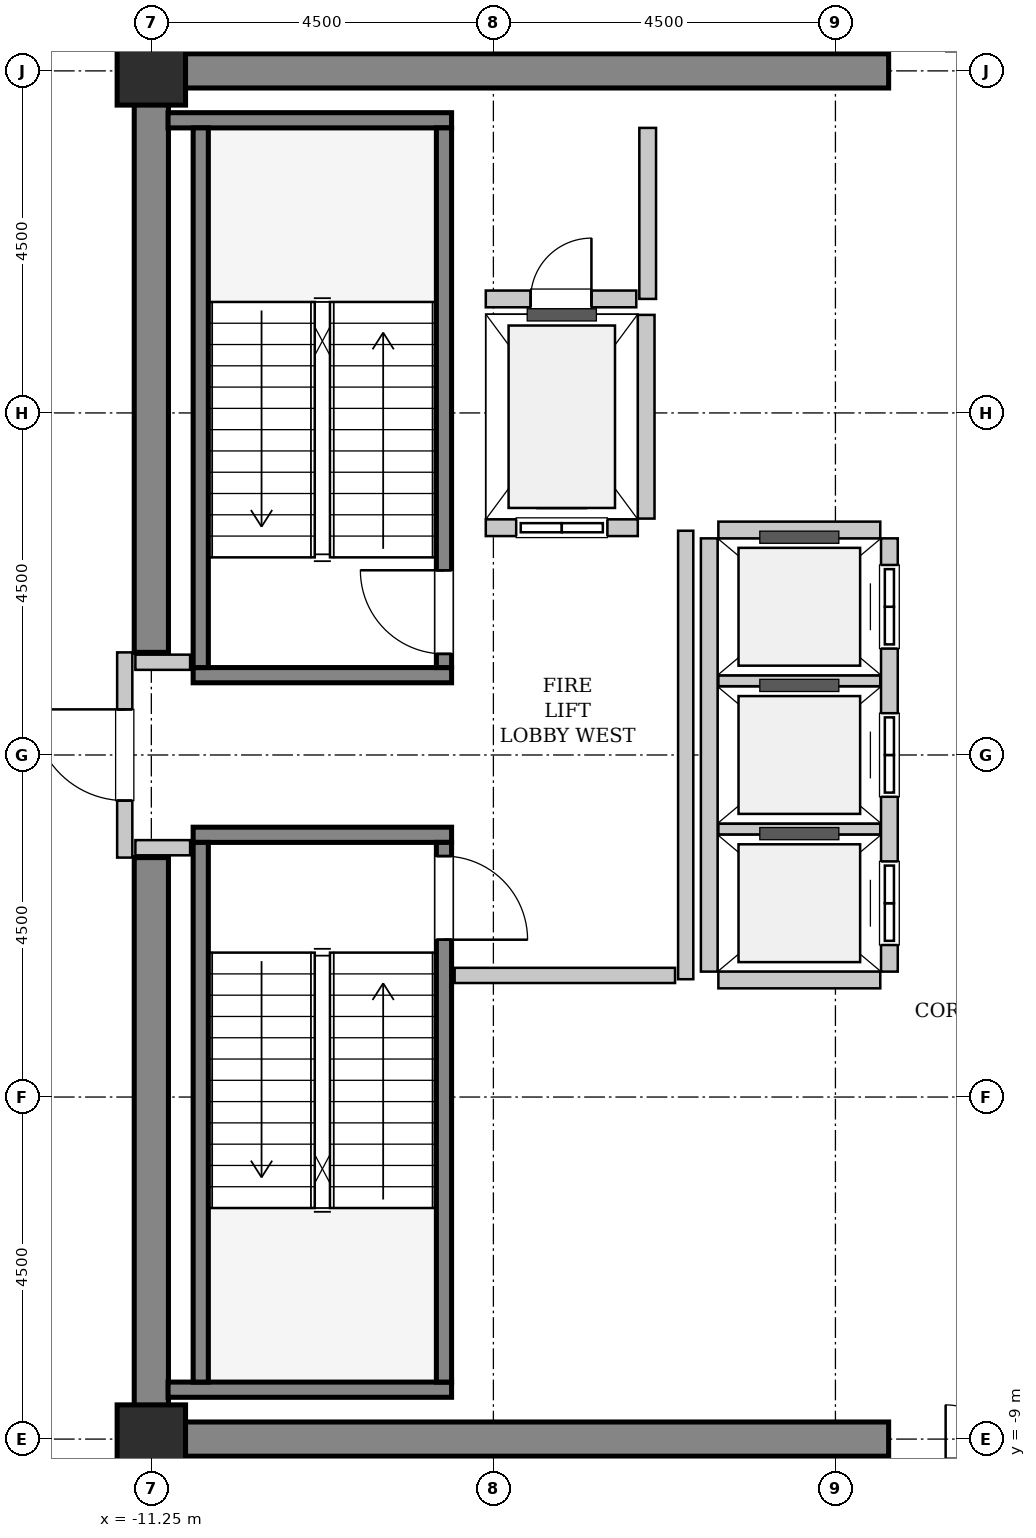
"""IFC4 building model, lengths in metres.
Left out: names, types, materials, properties, quantities, classifications, styles, units other than length and angle.
Written with IfcOpenShell. Run it as: python <this file> out.ifc"""

import sys

from ifc_helpers import new_model, si_unit, direction, frame, frame_2d, origin, origin_2d, place, context, subcontext, project, spatial, rectangle, extrude, source, transform, mapped, element, fill, save


model = new_model("IFC4")
c1 = context("Model", 3, precision=1e-05, world=origin(), true_north=direction((0.0, 1.0)))
c2 = subcontext(c1, "Body", "Model", "MODEL_VIEW")
j1 = project(units=[si_unit("LENGTHUNIT", "METRE"), si_unit("PLANEANGLEUNIT", "RADIAN")], contexts=[c1])
p1 = place(None, origin())
s1 = spatial("IfcSite", under=j1, at=p1, CompositionType="ELEMENT")
p2 = place(p1, origin())
s2 = spatial("IfcBuilding", under=s1, at=p2, CompositionType="ELEMENT")
p3 = place(p2, frame((0.0, 0.0, 317.8)))
s3 = spatial("IfcBuildingStorey", under=s2, at=p3, CompositionType="ELEMENT", Elevation=317.8)
m1 = source(origin(), c2, "Body", "SweptSolid", [
    extrude(rectangle(XDim=9.925, YDim=0.45, at=frame_2d((4.962, 0.0))), origin(), (0.0, 0.0, 1.0), 4.6),
])
for number, where, z_axis, x_axis in (
    (1, (-11.475, 9.0, 0.0), (0.0, 0.0, 1.0), (1.0, 0.0, 0.0)),
    (2, (-11.475, -9.0, 0.0), (0.0, 0.0, 1.0), (1.0, 0.0, 0.0)),
):
    element("IfcWall", number, at=place(p3, frame(where, z_axis=z_axis, x_axis=x_axis)), inside=s3, PredefinedType="SHEAR", context=c2, shape_type="MappedRepresentation", body=[
        mapped(m1, transform((0.0, 0.0, 0.0), x_axis=(1.0, 0.0, 0.0), y_axis=(0.0, 1.0, 0.0), z_axis=(0.0, 0.0, 1.0), scale=1.0)),
    ])
m2 = source(origin(), c2, "Body", "SweptSolid", [
    extrude(rectangle(XDim=7.425, YDim=0.45, at=frame_2d((3.712, 0.0))), origin(), (0.0, 0.0, 1.0), 4.6),
])
for number, where, z_axis, x_axis in (
    (3, (-11.25, -8.775, 0.0), (0.0, 0.0, 1.0), (0.0, 1.0, 0.0)),
    (4, (-11.25, 1.35, 0.0), (0.0, 0.0, 1.0), (0.0, 1.0, 0.0)),
):
    element("IfcWall", number, at=place(p3, frame(where, z_axis=z_axis, x_axis=x_axis)), inside=s3, PredefinedType="SHEAR", context=c2, shape_type="MappedRepresentation", body=[
        mapped(m2, transform((0.0, 0.0, 0.0), x_axis=(1.0, 0.0, 0.0), y_axis=(0.0, 1.0, 0.0), z_axis=(0.0, 0.0, 1.0), scale=1.0)),
    ])
m3 = source(origin(), c2, "Body", "SweptSolid", [
    extrude(rectangle(XDim=0.9, YDim=0.9, at=origin_2d()), origin(), (0.0, 0.0, 1.0), 4.6),
])
for number, where, z_axis, x_axis in (
    (5, (-11.25, -9.0, 0.0), (0.0, 0.0, 1.0), (1.0, 0.0, 0.0)),
    (6, (-11.25, 9.0, 0.0), (0.0, 0.0, 1.0), (1.0, 0.0, 0.0)),
):
    element("IfcColumn", number, at=place(p3, frame(where, z_axis=z_axis, x_axis=x_axis)), inside=s3, PredefinedType="COLUMN", context=c2, shape_type="MappedRepresentation", body=[
        mapped(m3, transform((0.0, 0.0, 0.0), x_axis=(1.0, 0.0, 0.0), y_axis=(0.0, 1.0, 0.0), z_axis=(0.0, 0.0, 1.0), scale=1.0)),
    ])
m4 = source(origin(), c2, "Body", "SweptSolid", [
    extrude(rectangle(XDim=3.4, YDim=0.2, at=frame_2d((1.7, 0.0))), origin(), (0.0, 0.0, 1.0), 4.6),
])
p4 = place(p3, frame((-7.3, 1.05, 0.0), z_axis=(0.0, 0.0, 1.0), x_axis=(-1.0, 0.0, 0.0)))
e7 = element("IfcWall", 7, at=p4, inside=s3, PredefinedType="SOLIDWALL", context=c2, shape_type="MappedRepresentation", body=[
    mapped(m4, transform((0.0, 0.0, 0.0), x_axis=(1.0, 0.0, 0.0), y_axis=(0.0, 1.0, 0.0), z_axis=(0.0, 0.0, 1.0), scale=1.0)),
])
m5 = source(origin(), c2, "Body", "SweptSolid", [
    extrude(rectangle(XDim=3.73, YDim=0.2, at=frame_2d((1.865, 0.0))), origin(), (0.0, 0.0, 1.0), 4.6),
])
p5 = place(p3, frame((-7.3, 8.35, 0.0), z_axis=(0.0, 0.0, 1.0), x_axis=(-1.0, 0.0, 0.0)))
e8 = element("IfcWall", 8, at=p5, inside=s3, PredefinedType="SOLIDWALL", context=c2, shape_type="MappedRepresentation", body=[
    mapped(m5, transform((0.0, 0.0, 0.0), x_axis=(1.0, 0.0, 0.0), y_axis=(0.0, 1.0, 0.0), z_axis=(0.0, 0.0, 1.0), scale=1.0)),
])
m6 = source(origin(), c2, "Body", "SweptSolid", [
    extrude(rectangle(XDim=7.1, YDim=0.2, at=frame_2d((3.55, 0.0))), origin(), (0.0, 0.0, 1.0), 4.6),
])
p6 = place(p3, frame((-7.4, 1.15, 0.0), z_axis=(0.0, 0.0, 1.0), x_axis=(0.0, 1.0, 0.0)))
e9 = element("IfcWall", 9, at=p6, inside=s3, PredefinedType="SOLIDWALL", context=c2, shape_type="MappedRepresentation", body=[
    mapped(m6, transform((0.0, 0.0, 0.0), x_axis=(1.0, 0.0, 0.0), y_axis=(0.0, 1.0, 0.0), z_axis=(0.0, 0.0, 1.0), scale=1.0)),
])
p7 = place(p6, frame((0.18, 0.0, 0.0)))
e10 = element("IfcOpeningElement", 10, at=p7, cuts=e9, PredefinedType="OPENING", context=c2, shape_type="SweptSolid", body=[
    extrude(rectangle(XDim=1.1, YDim=2.15, at=frame_2d((0.55, 1.075))), frame((0.0, 0.11, 0.0), z_axis=(0.0, -1.0, 0.0), x_axis=(1.0, 0.0, 0.0)), (0.0, 0.0, 1.0), 0.22),
])
p8 = place(p3, frame((-10.6, 1.15, 0.0), z_axis=(0.0, 0.0, 1.0), x_axis=(0.0, 1.0, 0.0)))
e11 = element("IfcWall", 11, at=p8, inside=s3, PredefinedType="SOLIDWALL", context=c2, shape_type="MappedRepresentation", body=[
    mapped(m6, transform((0.0, 0.0, 0.0), x_axis=(1.0, 0.0, 0.0), y_axis=(0.0, 1.0, 0.0), z_axis=(0.0, 0.0, 1.0), scale=1.0)),
])
p9 = place(p3, frame((-10.7, -1.05, 0.0), z_axis=(0.0, 0.0, 1.0), x_axis=(1.0, 0.0, 0.0)))
e12 = element("IfcWall", 12, at=p9, inside=s3, PredefinedType="SOLIDWALL", context=c2, shape_type="MappedRepresentation", body=[
    mapped(m4, transform((0.0, 0.0, 0.0), x_axis=(1.0, 0.0, 0.0), y_axis=(0.0, 1.0, 0.0), z_axis=(0.0, 0.0, 1.0), scale=1.0)),
])
p10 = place(p3, frame((-11.03, -8.35, 0.0), z_axis=(0.0, 0.0, 1.0), x_axis=(1.0, 0.0, 0.0)))
e13 = element("IfcWall", 13, at=p10, inside=s3, PredefinedType="SOLIDWALL", context=c2, shape_type="MappedRepresentation", body=[
    mapped(m5, transform((0.0, 0.0, 0.0), x_axis=(1.0, 0.0, 0.0), y_axis=(0.0, 1.0, 0.0), z_axis=(0.0, 0.0, 1.0), scale=1.0)),
])
p11 = place(p3, frame((-10.6, -1.15, 0.0), z_axis=(0.0, 0.0, 1.0), x_axis=(0.0, -1.0, 0.0)))
e14 = element("IfcWall", 14, at=p11, inside=s3, PredefinedType="SOLIDWALL", context=c2, shape_type="MappedRepresentation", body=[
    mapped(m6, transform((0.0, 0.0, 0.0), x_axis=(1.0, 0.0, 0.0), y_axis=(0.0, 1.0, 0.0), z_axis=(0.0, 0.0, 1.0), scale=1.0)),
])
p12 = place(p3, frame((-7.4, -1.15, 0.0), z_axis=(0.0, 0.0, 1.0), x_axis=(0.0, -1.0, 0.0)))
e15 = element("IfcWall", 15, at=p12, inside=s3, PredefinedType="SOLIDWALL", context=c2, shape_type="MappedRepresentation", body=[
    mapped(m6, transform((0.0, 0.0, 0.0), x_axis=(1.0, 0.0, 0.0), y_axis=(0.0, 1.0, 0.0), z_axis=(0.0, 0.0, 1.0), scale=1.0)),
])
p13 = place(p12, frame((0.18, 0.0, 0.0)))
e16 = element("IfcOpeningElement", 16, at=p13, cuts=e15, PredefinedType="OPENING", context=c2, shape_type="SweptSolid", body=[
    extrude(rectangle(XDim=1.1, YDim=2.15, at=frame_2d((0.55, 1.075))), frame((0.0, 0.11, 0.0), z_axis=(0.0, -1.0, 0.0), x_axis=(1.0, 0.0, 0.0)), (0.0, 0.0, 1.0), 0.22),
])
m7 = source(origin(), c2, "Body", "SweptSolid", [
    extrude(rectangle(XDim=2.0, YDim=0.22, at=frame_2d((1.0, 0.0))), origin(), (0.0, 0.0, 1.0), 4.335),
])
p14 = place(p3, frame((-6.85, 2.99, 0.0), z_axis=(0.0, 0.0, 1.0), x_axis=(1.0, 0.0, 0.0)))
e17 = element("IfcWall", 17, at=p14, inside=s3, PredefinedType="SOLIDWALL", context=c2, shape_type="MappedRepresentation", body=[
    mapped(m7, transform((0.0, 0.0, 0.0), x_axis=(1.0, 0.0, 0.0), y_axis=(0.0, 1.0, 0.0), z_axis=(0.0, 0.0, 1.0), scale=1.0)),
])
p15 = place(p14, frame((0.4, 0.0, 0.0)))
e18 = element("IfcOpeningElement", 18, at=p15, cuts=e17, PredefinedType="OPENING", context=c2, shape_type="SweptSolid", body=[
    extrude(rectangle(XDim=1.2, YDim=2.2, at=frame_2d((0.6, 1.1))), frame((0.0, 0.12, 0.0), z_axis=(0.0, -1.0, 0.0), x_axis=(1.0, 0.0, 0.0)), (0.0, 0.0, 1.0), 0.24),
])
m8 = source(origin(), c2, "Body", "SweptSolid", [
    extrude(rectangle(XDim=2.68, YDim=0.22, at=frame_2d((1.34, 0.0))), origin(), (0.0, 0.0, 1.0), 4.335),
])
p16 = place(p3, frame((-4.74, 3.11, 0.0), z_axis=(0.0, 0.0, 1.0), x_axis=(0.0, 1.0, 0.0)))
e19 = element("IfcWall", 19, at=p16, inside=s3, PredefinedType="SOLIDWALL", context=c2, shape_type="MappedRepresentation", body=[
    mapped(m8, transform((0.0, 0.0, 0.0), x_axis=(1.0, 0.0, 0.0), y_axis=(0.0, 1.0, 0.0), z_axis=(0.0, 0.0, 1.0), scale=1.0)),
])
m9 = source(origin(), c2, "Body", "SweptSolid", [
    extrude(rectangle(XDim=5.7, YDim=0.22, at=frame_2d((2.85, 0.0))), origin(), (0.0, 0.0, 1.0), 4.335),
])
p17 = place(p3, frame((-1.54, -2.85, 0.0), z_axis=(0.0, 0.0, 1.0), x_axis=(0.0, 1.0, 0.0)))
e20 = element("IfcWall", 20, at=p17, inside=s3, PredefinedType="SOLIDWALL", context=c2, shape_type="MappedRepresentation", body=[
    mapped(m9, transform((0.0, 0.0, 0.0), x_axis=(1.0, 0.0, 0.0), y_axis=(0.0, 1.0, 0.0), z_axis=(0.0, 0.0, 1.0), scale=1.0)),
])
p18 = place(p17, frame((0.35, 0.0, 0.0)))
e21 = element("IfcOpeningElement", 21, at=p18, cuts=e20, PredefinedType="OPENING", context=c2, shape_type="SweptSolid", body=[
    extrude(rectangle(XDim=1.1, YDim=2.2, at=frame_2d((0.55, 1.1))), frame((0.0, 0.12, 0.0), z_axis=(0.0, -1.0, 0.0), x_axis=(1.0, 0.0, 0.0)), (0.0, 0.0, 1.0), 0.24),
])
p19 = place(p17, frame((2.3, 0.0, 0.0)))
e22 = element("IfcOpeningElement", 22, at=p19, cuts=e20, PredefinedType="OPENING", context=c2, shape_type="SweptSolid", body=[
    extrude(rectangle(XDim=1.1, YDim=2.2, at=frame_2d((0.55, 1.1))), frame((0.0, 0.12, 0.0), z_axis=(0.0, -1.0, 0.0), x_axis=(1.0, 0.0, 0.0)), (0.0, 0.0, 1.0), 0.24),
])
p20 = place(p17, frame((4.25, 0.0, 0.0)))
e23 = element("IfcOpeningElement", 23, at=p20, cuts=e20, PredefinedType="OPENING", context=c2, shape_type="SweptSolid", body=[
    extrude(rectangle(XDim=1.1, YDim=2.2, at=frame_2d((0.55, 1.1))), frame((0.0, 0.12, 0.0), z_axis=(0.0, -1.0, 0.0), x_axis=(1.0, 0.0, 0.0)), (0.0, 0.0, 1.0), 0.24),
])
p21 = place(p3, frame((-3.91, 2.85, 0.0), z_axis=(0.0, 0.0, 1.0), x_axis=(0.0, -1.0, 0.0)))
e24 = element("IfcWall", 24, at=p21, inside=s3, PredefinedType="SOLIDWALL", context=c2, shape_type="MappedRepresentation", body=[
    mapped(m9, transform((0.0, 0.0, 0.0), x_axis=(1.0, 0.0, 0.0), y_axis=(0.0, 1.0, 0.0), z_axis=(0.0, 0.0, 1.0), scale=1.0)),
])
m10 = source(origin(), c2, "Body", "SweptSolid", [
    extrude(rectangle(XDim=2.13, YDim=0.22, at=frame_2d((1.065, 0.0))), origin(), (0.0, 0.0, 1.0), 4.335),
])
p22 = place(p3, frame((-3.79, -2.96, 0.0), z_axis=(0.0, 0.0, 1.0), x_axis=(1.0, 0.0, 0.0)))
e25 = element("IfcWall", 25, at=p22, inside=s3, PredefinedType="SOLIDWALL", context=c2, shape_type="MappedRepresentation", body=[
    mapped(m10, transform((0.0, 0.0, 0.0), x_axis=(1.0, 0.0, 0.0), y_axis=(0.0, 1.0, 0.0), z_axis=(0.0, 0.0, 1.0), scale=1.0)),
])
m11 = source(origin(), c2, "Body", "SweptSolid", [
    extrude(rectangle(XDim=2.13, YDim=0.14, at=frame_2d((1.065, 0.0))), origin(), (0.0, 0.0, 1.0), 4.335),
])
for number, where, z_axis, x_axis in (
    (26, (-3.79, -0.975, 0.0), (0.0, 0.0, 1.0), (1.0, 0.0, 0.0)),
    (27, (-3.79, 0.975, 0.0), (0.0, 0.0, 1.0), (1.0, 0.0, 0.0)),
):
    element("IfcWall", number, at=place(p3, frame(where, z_axis=z_axis, x_axis=x_axis)), inside=s3, PredefinedType="PARTITIONING", context=c2, shape_type="MappedRepresentation", body=[
        mapped(m11, transform((0.0, 0.0, 0.0), x_axis=(1.0, 0.0, 0.0), y_axis=(0.0, 1.0, 0.0), z_axis=(0.0, 0.0, 1.0), scale=1.0)),
    ])
p23 = place(p3, frame((-1.66, 2.96, 0.0), z_axis=(0.0, 0.0, 1.0), x_axis=(-1.0, 0.0, 0.0)))
e28 = element("IfcWall", 28, at=p23, inside=s3, PredefinedType="SOLIDWALL", context=c2, shape_type="MappedRepresentation", body=[
    mapped(m10, transform((0.0, 0.0, 0.0), x_axis=(1.0, 0.0, 0.0), y_axis=(0.0, 1.0, 0.0), z_axis=(0.0, 0.0, 1.0), scale=1.0)),
])
m12 = source(origin(), c2, "Body", "SweptSolid", [
    extrude(rectangle(XDim=2.25, YDim=0.22, at=frame_2d((1.125, 0.0))), origin(), (0.0, 0.0, 1.0), 4.335),
])
p24 = place(p3, frame((-4.72, 6.0, 0.0), z_axis=(0.0, 0.0, 1.0), x_axis=(0.0, 1.0, 0.0)))
e29 = element("IfcWall", 29, at=p24, inside=s3, PredefinedType="SOLIDWALL", context=c2, shape_type="MappedRepresentation", body=[
    mapped(m12, transform((0.0, 0.0, 0.0), x_axis=(1.0, 0.0, 0.0), y_axis=(0.0, 1.0, 0.0), z_axis=(0.0, 0.0, 1.0), scale=1.0)),
])
m13 = source(origin(), c2, "Body", "SweptSolid", [
    extrude(rectangle(XDim=1.98, YDim=0.22, at=frame_2d((0.99, 0.0))), origin(), (0.0, 0.0, 1.0), 4.335),
])
p25 = place(p3, frame((-6.85, 6.0, 0.0), z_axis=(0.0, 0.0, 1.0), x_axis=(1.0, 0.0, 0.0)))
e30 = element("IfcWall", 30, at=p25, inside=s3, PredefinedType="SOLIDWALL", context=c2, shape_type="MappedRepresentation", body=[
    mapped(m13, transform((0.0, 0.0, 0.0), x_axis=(1.0, 0.0, 0.0), y_axis=(0.0, 1.0, 0.0), z_axis=(0.0, 0.0, 1.0), scale=1.0)),
])
p26 = place(p25, frame((0.59, 0.0, 0.0)))
e31 = element("IfcOpeningElement", 31, at=p26, cuts=e30, PredefinedType="OPENING", context=c2, shape_type="SweptSolid", body=[
    extrude(rectangle(XDim=0.8, YDim=2.0, at=frame_2d((0.4, 1.0))), frame((0.0, 0.12, 0.0), z_axis=(0.0, -1.0, 0.0), x_axis=(1.0, 0.0, 0.0)), (0.0, 0.0, 1.0), 0.24),
])
m14 = source(origin(), c2, "Body", "SweptSolid", [
    extrude(rectangle(XDim=2.7, YDim=0.2, at=frame_2d((1.35, 0.0))), origin(), (0.0, 0.0, 1.0), 3.425),
])
p27 = place(p3, frame((-11.6, -1.35, 0.0), z_axis=(0.0, 0.0, 1.0), x_axis=(0.0, 1.0, 0.0)))
e32 = element("IfcWall", 32, at=p27, inside=s3, PredefinedType="PARTITIONING", context=c2, shape_type="MappedRepresentation", body=[
    mapped(m14, transform((0.0, 0.0, 0.0), x_axis=(1.0, 0.0, 0.0), y_axis=(0.0, 1.0, 0.0), z_axis=(0.0, 0.0, 1.0), scale=1.0)),
])
p28 = place(p27, frame((0.75, 0.0, 0.0)))
e33 = element("IfcOpeningElement", 33, at=p28, cuts=e32, PredefinedType="OPENING", context=c2, shape_type="SweptSolid", body=[
    extrude(rectangle(XDim=1.2, YDim=2.15, at=frame_2d((0.6, 1.075))), frame((0.0, 0.11, 0.0), z_axis=(0.0, -1.0, 0.0), x_axis=(1.0, 0.0, 0.0)), (0.0, 0.0, 1.0), 0.22),
])
m15 = source(origin(), c2, "Body", "SweptSolid", [
    extrude(rectangle(XDim=5.9, YDim=0.2, at=frame_2d((2.95, 0.0))), origin(), (0.0, 0.0, 1.0), 4.335),
])
p29 = place(p3, frame((-4.22, -2.95, 0.0), z_axis=(0.0, 0.0, 1.0), x_axis=(0.0, 1.0, 0.0)))
e34 = element("IfcWall", 34, at=p29, inside=s3, PredefinedType="PARTITIONING", context=c2, shape_type="MappedRepresentation", body=[
    mapped(m15, transform((0.0, 0.0, 0.0), x_axis=(1.0, 0.0, 0.0), y_axis=(0.0, 1.0, 0.0), z_axis=(0.0, 0.0, 1.0), scale=1.0)),
])
m16 = source(origin(), c2, "Body", "SweptSolid", [
    extrude(rectangle(XDim=2.9, YDim=0.2, at=frame_2d((1.45, 0.0))), origin(), (0.0, 0.0, 1.0), 4.335),
])
p30 = place(p3, frame((-7.26, -2.9, 0.0), z_axis=(0.0, 0.0, 1.0), x_axis=(1.0, 0.0, 0.0)))
e35 = element("IfcWall", 35, at=p30, inside=s3, PredefinedType="PARTITIONING", context=c2, shape_type="MappedRepresentation", body=[
    mapped(m16, transform((0.0, 0.0, 0.0), x_axis=(1.0, 0.0, 0.0), y_axis=(0.0, 1.0, 0.0), z_axis=(0.0, 0.0, 1.0), scale=1.0)),
])
m17 = source(origin(), c2, "Body", "SweptSolid", [
    extrude(rectangle(XDim=0.72, YDim=0.2, at=frame_2d((0.36, 0.0))), origin(), (0.0, 0.0, 1.0), 4.335),
])
for number, where, z_axis, x_axis in (
    (36, (-11.46, 1.22, 0.0), (0.0, 0.0, 1.0), (1.0, 0.0, 0.0)),
    (37, (-11.46, -1.22, 0.0), (0.0, 0.0, 1.0), (1.0, 0.0, 0.0)),
):
    element("IfcWall", number, at=place(p3, frame(where, z_axis=z_axis, x_axis=x_axis)), inside=s3, PredefinedType="PARTITIONING", context=c2, shape_type="MappedRepresentation", body=[
        mapped(m17, transform((0.0, 0.0, 0.0), x_axis=(1.0, 0.0, 0.0), y_axis=(0.0, 1.0, 0.0), z_axis=(0.0, 0.0, 1.0), scale=1.0)),
    ])
m18 = source(origin(), c2, "Body", "SweptSolid", [
    extrude(rectangle(XDim=1.1, YDim=2.15, at=frame_2d((0.55, 1.075))), frame((0.0, 0.025, 0.0), z_axis=(0.0, -1.0, 0.0), x_axis=(1.0, 0.0, 0.0)), (0.0, 0.0, 1.0), 0.05),
])
p31 = place(p7, origin())
e38 = element("IfcDoor", 38, at=p31, inside=s3, OperationType="SINGLE_SWING_RIGHT", PredefinedType="DOOR", context=c2, shape_type="MappedRepresentation", body=[
    mapped(m18, transform((0.0, 0.0, 0.0), x_axis=(1.0, 0.0, 0.0), y_axis=(0.0, 1.0, 0.0), z_axis=(0.0, 0.0, 1.0), scale=1.0)),
])
fill(e10, e38)
p32 = place(p13, origin())
e39 = element("IfcDoor", 39, at=p32, inside=s3, OperationType="SINGLE_SWING_RIGHT", PredefinedType="DOOR", context=c2, shape_type="MappedRepresentation", body=[
    mapped(m18, transform((0.0, 0.0, 0.0), x_axis=(1.0, 0.0, 0.0), y_axis=(0.0, 1.0, 0.0), z_axis=(0.0, 0.0, 1.0), scale=1.0)),
])
fill(e16, e39)
m19 = source(origin(), c2, "Body", "SweptSolid", [
    extrude(rectangle(XDim=1.2, YDim=2.2, at=frame_2d((0.6, 1.1))), frame((0.0, 0.025, 0.0), z_axis=(0.0, -1.0, 0.0), x_axis=(1.0, 0.0, 0.0)), (0.0, 0.0, 1.0), 0.05),
])
p33 = place(p15, origin())
e40 = element("IfcDoor", 40, at=p33, inside=s3, OperationType="SLIDING_TO_LEFT", PredefinedType="DOOR", context=c2, shape_type="MappedRepresentation", body=[
    mapped(m19, transform((0.0, 0.0, 0.0), x_axis=(1.0, 0.0, 0.0), y_axis=(0.0, 1.0, 0.0), z_axis=(0.0, 0.0, 1.0), scale=1.0)),
])
fill(e18, e40)
m20 = source(origin(), c2, "Body", "SweptSolid", [
    extrude(rectangle(XDim=1.1, YDim=2.2, at=frame_2d((0.55, 1.1))), frame((0.0, 0.025, 0.0), z_axis=(0.0, -1.0, 0.0), x_axis=(1.0, 0.0, 0.0)), (0.0, 0.0, 1.0), 0.05),
])
p34 = place(p18, origin())
e41 = element("IfcDoor", 41, at=p34, inside=s3, OperationType="DOUBLE_DOOR_SLIDING", PredefinedType="DOOR", context=c2, shape_type="MappedRepresentation", body=[
    mapped(m20, transform((0.0, 0.0, 0.0), x_axis=(1.0, 0.0, 0.0), y_axis=(0.0, 1.0, 0.0), z_axis=(0.0, 0.0, 1.0), scale=1.0)),
])
fill(e21, e41)
p35 = place(p19, origin())
e42 = element("IfcDoor", 42, at=p35, inside=s3, OperationType="DOUBLE_DOOR_SLIDING", PredefinedType="DOOR", context=c2, shape_type="MappedRepresentation", body=[
    mapped(m20, transform((0.0, 0.0, 0.0), x_axis=(1.0, 0.0, 0.0), y_axis=(0.0, 1.0, 0.0), z_axis=(0.0, 0.0, 1.0), scale=1.0)),
])
fill(e22, e42)
p36 = place(p20, origin())
e43 = element("IfcDoor", 43, at=p36, inside=s3, OperationType="DOUBLE_DOOR_SLIDING", PredefinedType="DOOR", context=c2, shape_type="MappedRepresentation", body=[
    mapped(m20, transform((0.0, 0.0, 0.0), x_axis=(1.0, 0.0, 0.0), y_axis=(0.0, 1.0, 0.0), z_axis=(0.0, 0.0, 1.0), scale=1.0)),
])
fill(e23, e43)
m21 = source(origin(), c2, "Body", "SweptSolid", [
    extrude(rectangle(XDim=0.8, YDim=2.0, at=frame_2d((0.4, 1.0))), frame((0.0, 0.025, 0.0), z_axis=(0.0, -1.0, 0.0), x_axis=(1.0, 0.0, 0.0)), (0.0, 0.0, 1.0), 0.05),
])
p37 = place(p26, origin())
e44 = element("IfcDoor", 44, at=p37, inside=s3, OperationType="SINGLE_SWING_RIGHT", PredefinedType="TRAPDOOR", context=c2, shape_type="MappedRepresentation", body=[
    mapped(m21, transform((0.0, 0.0, 0.0), x_axis=(1.0, 0.0, 0.0), y_axis=(0.0, 1.0, 0.0), z_axis=(0.0, 0.0, 1.0), scale=1.0)),
])
fill(e31, e44)
m22 = source(origin(), c2, "Body", "SweptSolid", [
    extrude(rectangle(XDim=1.2, YDim=2.15, at=frame_2d((0.6, 1.075))), frame((0.0, 0.025, 0.0), z_axis=(0.0, -1.0, 0.0), x_axis=(1.0, 0.0, 0.0)), (0.0, 0.0, 1.0), 0.05),
])
p38 = place(p28, origin())
e45 = element("IfcDoor", 45, at=p38, inside=s3, OperationType="SINGLE_SWING_RIGHT", PredefinedType="DOOR", context=c2, shape_type="MappedRepresentation", body=[
    mapped(m22, transform((0.0, 0.0, 0.0), x_axis=(1.0, 0.0, 0.0), y_axis=(0.0, 1.0, 0.0), z_axis=(0.0, 0.0, 1.0), scale=1.0)),
])
fill(e33, e45)
save(model, sys.argv[1])
